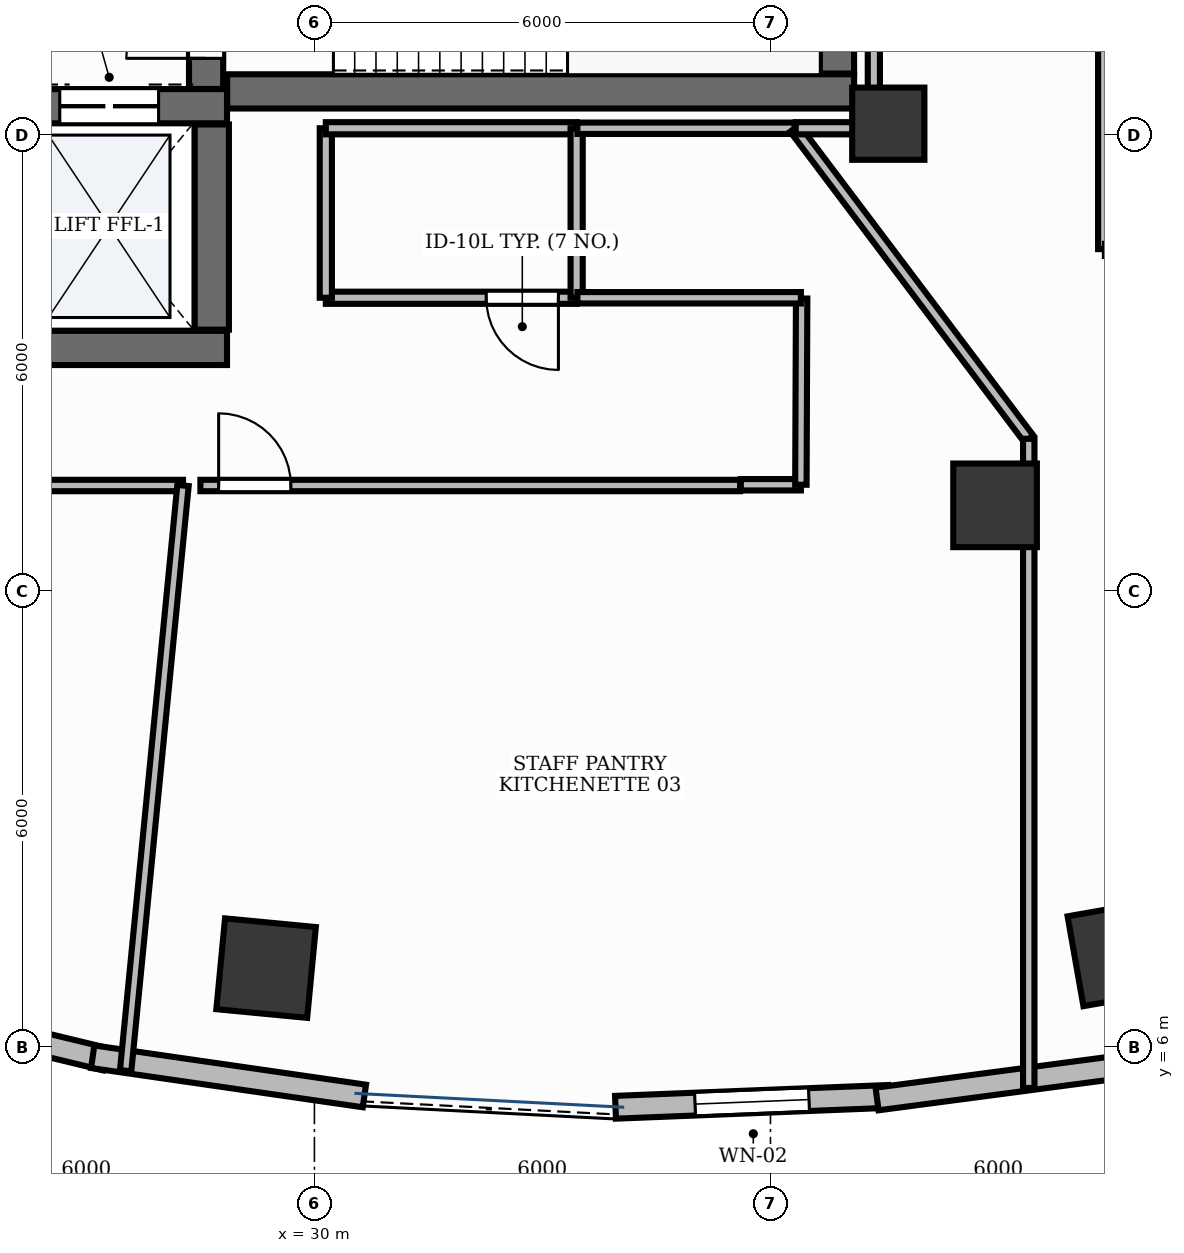
"""IFC4 building model, lengths in metres.
Left out: names, types, materials, properties, quantities, classifications, styles, units other than length and angle.
Written with IfcOpenShell. Run it as: python <this file> out.ifc"""

import sys

from ifc_helpers import new_model, si_unit, direction, frame, frame_2d, origin, origin_2d, place, context, subcontext, project, spatial, rectangle, extrude, element, fill, save


model = new_model("IFC4")
c1 = context("Model", 3, precision=1e-05, world=origin(), true_north=direction((0.0, 1.0)))
c2 = subcontext(c1, "Body", "Model", "MODEL_VIEW")
j1 = project(units=[si_unit("LENGTHUNIT", "METRE"), si_unit("PLANEANGLEUNIT", "RADIAN")], contexts=[c1])
p1 = place(None, origin())
s1 = spatial("IfcSite", under=j1, at=p1, CompositionType="ELEMENT")
p2 = place(p1, origin())
s2 = spatial("IfcBuilding", under=s1, at=p2, CompositionType="ELEMENT")
p3 = place(p2, frame((0.0, 0.0, 98.4)))
s3 = spatial("IfcBuildingStorey", under=s2, at=p3, CompositionType="ELEMENT", Elevation=98.4)
p4 = place(p3, frame((28.852, 18.575, 0.0), z_axis=(0.0, 0.0, 1.0), x_axis=(1.0, 0.0, 0.0)))
e1 = element("IfcWall", 1, at=p4, inside=s3, PredefinedType="SHEAR", context=c2, shape_type="SweptSolid", body=[
    extrude(rectangle(XDim=8.248, YDim=0.45, at=frame_2d((4.124, 0.0))), origin(), (0.0, 0.0, 1.0), 3.9),
])
p5 = place(p3, frame((36.875, 18.81, 0.0), z_axis=(0.0, 0.0, 1.0), x_axis=(0.0, 1.0, 0.0)))
e2 = element("IfcWall", 2, at=p5, inside=s3, PredefinedType="SHEAR", context=c2, shape_type="SweptSolid", body=[
    extrude(rectangle(XDim=3.08, YDim=0.45, at=frame_2d((1.54, 0.0))), origin(), (0.0, 0.0, 1.0), 3.9),
])
p6 = place(p3, frame((28.575, 18.607, 0.0), z_axis=(0.0, 0.0, 1.0), x_axis=(0.0, 1.0, 0.0)))
e3 = element("IfcWall", 3, at=p6, inside=s3, PredefinedType="SHEAR", context=c2, shape_type="SweptSolid", body=[
    extrude(rectangle(XDim=3.283, YDim=0.45, at=frame_2d((1.642, 0.0))), origin(), (0.0, 0.0, 1.0), 3.9),
])
p7 = place(p6, frame((0.403, 0.0, 0.0)))
e4 = element("IfcOpeningElement", 4, at=p7, cuts=e3, PredefinedType="OPENING", context=c2, shape_type="SweptSolid", body=[
    extrude(rectangle(XDim=1.05, YDim=2.15, at=frame_2d((0.525, 1.075))), frame((0.0, 0.24, 0.0), z_axis=(0.0, -1.0, 0.0), x_axis=(1.0, 0.0, 0.0)), (0.0, 0.0, 1.0), 0.48),
])
p8 = place(p3, frame((25.75, 15.2, 0.0), z_axis=(0.0, 0.0, 1.0), x_axis=(1.0, 0.0, 0.0)))
e5 = element("IfcWall", 5, at=p8, inside=s3, PredefinedType="SHEAR", context=c2, shape_type="SweptSolid", body=[
    extrude(rectangle(XDim=3.1, YDim=0.45, at=frame_2d((1.55, 0.0))), origin(), (0.0, 0.0, 1.0), 3.9),
])
p9 = place(p3, frame((25.75, 18.38, 0.0), z_axis=(0.0, 0.0, 1.0), x_axis=(1.0, 0.0, 0.0)))
e6 = element("IfcWall", 6, at=p9, inside=s3, PredefinedType="SHEAR", context=c2, shape_type="SweptSolid", body=[
    extrude(rectangle(XDim=3.1, YDim=0.45, at=frame_2d((1.55, 0.0))), origin(), (0.0, 0.0, 1.0), 3.9),
])
p10 = place(p9, frame((0.9, 0.0, 0.0)))
e7 = element("IfcOpeningElement", 7, at=p10, cuts=e6, PredefinedType="OPENING", context=c2, shape_type="SweptSolid", body=[
    extrude(rectangle(XDim=1.3, YDim=2.2, at=frame_2d((0.65, 1.1))), frame((0.0, 0.24, 0.0), z_axis=(0.0, -1.0, 0.0), x_axis=(1.0, 0.0, 0.0)), (0.0, 0.0, 1.0), 0.48),
])
p11 = place(p3, frame((28.65, 15.44, 0.0), z_axis=(0.0, 0.0, 1.0), x_axis=(0.0, 1.0, 0.0)))
e8 = element("IfcWall", 8, at=p11, inside=s3, PredefinedType="SHEAR", context=c2, shape_type="SweptSolid", body=[
    extrude(rectangle(XDim=2.7, YDim=0.45, at=frame_2d((1.35, 0.0))), origin(), (0.0, 0.0, 1.0), 3.9),
])
p12 = place(p3, frame((37.55, 18.15, -0.0), z_axis=(0.0, 0.0, 1.0), x_axis=(1.0, 0.0, 0.0)))
e9 = element("IfcColumn", 9, at=p12, inside=s3, PredefinedType="PILASTER", context=c2, shape_type="SweptSolid", body=[
    extrude(rectangle(XDim=0.95, YDim=0.95, at=origin_2d()), origin(), (0.0, 0.0, 1.0), 3.901),
])
for number, where, z_axis, x_axis in (
    (10, (29.364, 7.041, -0.0), (0.0, 0.0, 1.0), (-0.995, 0.095, 0.0)),
    (11, (40.604, 7.235, -0.0), (0.0, 0.0, 1.0), (0.985, 0.173, 0.0)),
):
    element("IfcColumn", number, at=place(p3, frame(where, z_axis=z_axis, x_axis=x_axis)), inside=s3, PredefinedType="COLUMN", context=c2, shape_type="SweptSolid", body=[
        extrude(rectangle(XDim=1.2, YDim=1.2, at=origin_2d()), origin(), (0.0, 0.0, 1.0), 3.901),
    ])
p13 = place(p3, frame((38.955, 13.129, -0.0), z_axis=(0.0, 0.0, 1.0), x_axis=(1.0, 0.0, 0.0)))
e12 = element("IfcColumn", 12, at=p13, inside=s3, PredefinedType="COLUMN", context=c2, shape_type="SweptSolid", body=[
    extrude(rectangle(XDim=1.1, YDim=1.1, at=origin_2d()), origin(), (0.0, 0.0, 1.0), 3.901),
])
p14 = place(p3, frame((33.961, 5.21, 0.0), z_axis=(0.0, 0.0, 1.0), x_axis=(0.999210691503, 0.039723972445, 0.0)))
e13 = element("IfcWall", 13, at=p14, inside=s3, PredefinedType="STANDARD", context=c2, shape_type="SweptSolid", body=[
    extrude(rectangle(XDim=3.595, YDim=0.3, at=frame_2d((1.798, 0.0))), origin(), (0.0, 0.0, 1.0), 3.9),
])
p15 = place(p14, frame((1.048, 0.0, 0.95)))
e14 = element("IfcOpeningElement", 14, at=p15, cuts=e13, PredefinedType="OPENING", context=c2, shape_type="SweptSolid", body=[
    extrude(rectangle(XDim=1.5, YDim=1.8, at=frame_2d((0.75, 0.9))), frame((0.0, 0.165, 0.0), z_axis=(0.0, -1.0, 0.0), x_axis=(1.0, 0.0, 0.0)), (0.0, 0.0, 1.0), 0.33),
])
p16 = place(p3, frame((23.784, 6.68, 0.0), z_axis=(0.0, 0.0, 1.0), x_axis=(0.972043452321, -0.234801036625, 0.0)))
e15 = element("IfcWall", 15, at=p16, inside=s3, PredefinedType="STANDARD", context=c2, shape_type="SweptSolid", body=[
    extrude(rectangle(XDim=3.569, YDim=0.3, at=frame_2d((1.784, 0.0))), origin(), (0.0, 0.0, 1.0), 3.9),
])
p17 = place(p3, frame((27.083, 5.875, 0.0), z_axis=(0.0, 0.0, 1.0), x_axis=(0.989734732902, -0.142916613754, 0.0)))
e16 = element("IfcWall", 16, at=p17, inside=s3, PredefinedType="STANDARD", context=c2, shape_type="SweptSolid", body=[
    extrude(rectangle(XDim=3.611, YDim=0.3, at=frame_2d((1.806, 0.0))), origin(), (0.0, 0.0, 1.0), 3.9),
])
p18 = place(p3, frame((37.402, 5.319, 0.0), z_axis=(0.0, 0.0, 1.0), x_axis=(0.991372969521, 0.131071107816, 0.0)))
e17 = element("IfcWall", 17, at=p18, inside=s3, PredefinedType="STANDARD", context=c2, shape_type="SweptSolid", body=[
    extrude(rectangle(XDim=3.615, YDim=0.3, at=frame_2d((1.808, 0.0))), origin(), (0.0, 0.0, 1.0), 3.9),
])
p19 = place(p3, frame((33.45, 15.86, 0.0), z_axis=(0.0, 0.0, 1.0), x_axis=(-1.0, 0.0, 0.0)))
e18 = element("IfcWall", 18, at=p19, inside=s3, PredefinedType="PARTITIONING", context=c2, shape_type="SweptSolid", body=[
    extrude(rectangle(XDim=3.3, YDim=0.16, at=frame_2d((1.65, 0.0))), origin(), (0.0, 0.0, 1.0), 2.91),
])
p20 = place(p19, frame((0.24, 0.0, 0.0)))
e19 = element("IfcOpeningElement", 19, at=p20, cuts=e18, PredefinedType="OPENING", context=c2, shape_type="SweptSolid", body=[
    extrude(rectangle(XDim=0.95, YDim=2.15, at=frame_2d((0.475, 1.075))), frame((0.0, 0.095, 0.0), z_axis=(0.0, -1.0, 0.0), x_axis=(1.0, 0.0, 0.0)), (0.0, 0.0, 1.0), 0.19),
])
p21 = place(p3, frame((21.8, 13.39, 0.0), z_axis=(0.0, 0.0, 1.0), x_axis=(1.0, 0.0, 0.0)))
e20 = element("IfcWall", 20, at=p21, inside=s3, PredefinedType="PARTITIONING", context=c2, shape_type="SweptSolid", body=[
    extrude(rectangle(XDim=6.471, YDim=0.15, at=frame_2d((3.236, 0.0))), origin(), (0.0, 0.0, 1.0), 2.91),
])
p22 = place(p21, frame((0.859, 0.0, 0.0)))
e21 = element("IfcOpeningElement", 21, at=p22, cuts=e20, PredefinedType="OPENING", context=c2, shape_type="SweptSolid", body=[
    extrude(rectangle(XDim=0.95, YDim=2.15, at=frame_2d((0.475, 1.075))), frame((0.0, 0.09, 0.0), z_axis=(0.0, -1.0, 0.0), x_axis=(1.0, 0.0, 0.0)), (0.0, 0.0, 1.0), 0.18),
])
p23 = place(p3, frame((28.5, 13.39, 0.0), z_axis=(0.0, 0.0, 1.0), x_axis=(1.0, 0.0, 0.0)))
e22 = element("IfcWall", 22, at=p23, inside=s3, PredefinedType="PARTITIONING", context=c2, shape_type="SweptSolid", body=[
    extrude(rectangle(XDim=7.1, YDim=0.15, at=frame_2d((3.55, 0.0))), origin(), (0.0, 0.0, 1.0), 2.91),
])
p24 = place(p23, frame((0.24, 0.0, 0.0)))
e23 = element("IfcOpeningElement", 23, at=p24, cuts=e22, PredefinedType="OPENING", context=c2, shape_type="SweptSolid", body=[
    extrude(rectangle(XDim=0.95, YDim=2.15, at=frame_2d((0.475, 1.075))), frame((0.0, 0.09, 0.0), z_axis=(0.0, -1.0, 0.0), x_axis=(1.0, 0.0, 0.0)), (0.0, 0.0, 1.0), 0.18),
])
p25 = place(p3, frame((30.15, 15.86, 0.0), z_axis=(0.0, 0.0, 1.0), x_axis=(0.0, 1.0, 0.0)))
e24 = element("IfcWall", 24, at=p25, inside=s3, PredefinedType="PARTITIONING", context=c2, shape_type="SweptSolid", body=[
    extrude(rectangle(XDim=2.23, YDim=0.16, at=frame_2d((1.115, 0.0))), origin(), (0.0, 0.0, 1.0), 2.91),
])
p26 = place(p3, frame((30.15, 18.09, 0.0), z_axis=(0.0, 0.0, 1.0), x_axis=(1.0, 0.0, 0.0)))
e25 = element("IfcWall", 25, at=p26, inside=s3, PredefinedType="PARTITIONING", context=c2, shape_type="SweptSolid", body=[
    extrude(rectangle(XDim=3.3, YDim=0.16, at=frame_2d((1.65, 0.0))), origin(), (0.0, 0.0, 1.0), 2.91),
])
p27 = place(p3, frame((33.45, 18.09, 0.0), z_axis=(0.0, 0.0, 1.0), x_axis=(0.0, -1.0, 0.0)))
e26 = element("IfcWall", 26, at=p27, inside=s3, PredefinedType="PARTITIONING", context=c2, shape_type="SweptSolid", body=[
    extrude(rectangle(XDim=2.23, YDim=0.16, at=frame_2d((1.115, 0.0))), origin(), (0.0, 0.0, 1.0), 2.91),
])
p28 = place(p3, frame((28.271, 13.39, 0.0), z_axis=(0.0, 0.0, 1.0), x_axis=(-0.097584908723, -0.995227202999, 0.0)))
e27 = element("IfcWall", 27, at=p28, inside=s3, PredefinedType="PARTITIONING", context=c2, shape_type="SweptSolid", body=[
    extrude(rectangle(XDim=7.736, YDim=0.15, at=frame_2d((3.868, 0.0))), origin(), (0.0, 0.0, 1.0), 2.91),
])
p29 = place(p3, frame((35.61, 13.4, 0.0), z_axis=(0.0, 0.0, 1.0), x_axis=(1.0, 0.0, 0.0)))
e28 = element("IfcWall", 28, at=p29, inside=s3, PredefinedType="PARTITIONING", context=c2, shape_type="SweptSolid", body=[
    extrude(rectangle(XDim=0.79, YDim=0.15, at=frame_2d((0.395, 0.0))), origin(), (0.0, 0.0, 1.0), 2.91),
])
p30 = place(p3, frame((36.4, 13.4, 0.0), z_axis=(0.0, 0.0, 1.0), x_axis=(0.004085258855, 0.999991655295, 0.0)))
e29 = element("IfcWall", 29, at=p30, inside=s3, PredefinedType="PARTITIONING", context=c2, shape_type="SweptSolid", body=[
    extrude(rectangle(XDim=2.45, YDim=0.15, at=frame_2d((1.225, 0.0))), origin(), (0.0, 0.0, 1.0), 2.91),
])
p31 = place(p3, frame((36.4, 15.86, 0.0), z_axis=(0.0, 0.0, 1.0), x_axis=(-1.0, 0.0, 0.0)))
e30 = element("IfcWall", 30, at=p31, inside=s3, PredefinedType="PARTITIONING", context=c2, shape_type="SweptSolid", body=[
    extrude(rectangle(XDim=2.94, YDim=0.15, at=frame_2d((1.47, 0.0))), origin(), (0.0, 0.0, 1.0), 2.91),
])
p32 = place(p3, frame((33.46, 18.09, 0.0), z_axis=(0.0, 0.0, 1.0), x_axis=(1.0, 0.0, 0.0)))
e31 = element("IfcWall", 31, at=p32, inside=s3, PredefinedType="PARTITIONING", context=c2, shape_type="SweptSolid", body=[
    extrude(rectangle(XDim=2.859, YDim=0.15, at=frame_2d((1.43, 0.0))), origin(), (0.0, 0.0, 1.0), 2.91),
])
p33 = place(p3, frame((36.319, 18.09, 0.0), z_axis=(0.0, 0.0, 1.0), x_axis=(0.601792892962, -0.798652185861, 0.0)))
e32 = element("IfcWall", 32, at=p33, inside=s3, PredefinedType="PARTITIONING", context=c2, shape_type="SweptSolid", body=[
    extrude(rectangle(XDim=5.116, YDim=0.15, at=frame_2d((2.558, 0.0))), origin(), (0.0, 0.0, 1.0), 2.91),
])
p34 = place(p3, frame((39.398, 14.004, 0.0), z_axis=(0.0, 0.0, 1.0), x_axis=(0.0, -1.0, 0.0)))
e33 = element("IfcWall", 33, at=p34, inside=s3, PredefinedType="PARTITIONING", context=c2, shape_type="SweptSolid", body=[
    extrude(rectangle(XDim=8.54, YDim=0.15, at=frame_2d((4.27, 0.0))), origin(), (0.0, 0.0, 1.0), 2.91),
])
p35 = place(p3, frame((40.39, 20.416, 0.0), z_axis=(0.0, 0.0, 1.0), x_axis=(0.0, -1.0, 0.0)))
e34 = element("IfcWall", 34, at=p35, inside=s3, PredefinedType="PARTITIONING", context=c2, shape_type="SweptSolid", body=[
    extrude(rectangle(XDim=3.916, YDim=0.16, at=frame_2d((1.958, 0.0))), origin(), (0.0, 0.0, 1.0), 2.91),
])
p36 = place(p3, frame((36.332, 18.09, 0.0), z_axis=(0.0, 0.0, 1.0), x_axis=(1.0, 0.0, 0.0)))
e35 = element("IfcWall", 35, at=p36, inside=s3, PredefinedType="PARTITIONING", context=c2, shape_type="SweptSolid", body=[
    extrude(rectangle(XDim=1.018, YDim=0.16, at=frame_2d((0.509, 0.0))), origin(), (0.0, 0.0, 1.0), 2.91),
])
p37 = place(p3, frame((37.36, 18.1, 0.0), z_axis=(0.0, 0.0, 1.0), x_axis=(0.0, 1.0, 0.0)))
e36 = element("IfcWall", 36, at=p37, inside=s3, PredefinedType="PARTITIONING", context=c2, shape_type="SweptSolid", body=[
    extrude(rectangle(XDim=4.166, YDim=0.16, at=frame_2d((2.083, 0.0))), origin(), (0.0, 0.0, 1.0), 2.91),
])
p38 = place(p15, origin())
e37 = element("IfcWindow", 37, at=p38, inside=s3, PartitioningType="DOUBLE_PANEL_VERTICAL", PredefinedType="WINDOW", context=c2, shape_type="SweptSolid", body=[
    extrude(rectangle(XDim=1.5, YDim=1.8, at=frame_2d((0.75, 0.9))), frame((0.0, 0.03, 0.0), z_axis=(0.0, -1.0, 0.0), x_axis=(1.0, 0.0, 0.0)), (0.0, 0.0, 1.0), 0.06),
])
fill(e14, e37)
p39 = place(p7, origin())
e38 = element("IfcDoor", 38, at=p39, inside=s3, OperationType="SINGLE_SWING_LEFT", PredefinedType="DOOR", context=c2, shape_type="SweptSolid", body=[
    extrude(rectangle(XDim=1.05, YDim=2.15, at=frame_2d((0.525, 1.075))), frame((0.0, 0.025, 0.0), z_axis=(0.0, -1.0, 0.0), x_axis=(1.0, 0.0, 0.0)), (0.0, 0.0, 1.0), 0.05),
])
fill(e4, e38)
p40 = place(p10, origin())
e39 = element("IfcDoor", 39, at=p40, inside=s3, OperationType="DOUBLE_DOOR_SLIDING", PredefinedType="DOOR", context=c2, shape_type="SweptSolid", body=[
    extrude(rectangle(XDim=1.3, YDim=2.2, at=frame_2d((0.65, 1.1))), frame((0.0, 0.025, 0.0), z_axis=(0.0, -1.0, 0.0), x_axis=(1.0, 0.0, 0.0)), (0.0, 0.0, 1.0), 0.05),
])
fill(e7, e39)
p41 = place(p20, origin())
e40 = element("IfcDoor", 40, at=p41, inside=s3, OperationType="SINGLE_SWING_LEFT", PredefinedType="DOOR", context=c2, shape_type="SweptSolid", body=[
    extrude(rectangle(XDim=0.95, YDim=2.15, at=frame_2d((0.475, 1.075))), frame((0.0, 0.025, 0.0), z_axis=(0.0, -1.0, 0.0), x_axis=(1.0, 0.0, 0.0)), (0.0, 0.0, 1.0), 0.05),
])
fill(e19, e40)
p42 = place(p24, origin())
e41 = element("IfcDoor", 41, at=p42, inside=s3, OperationType="SINGLE_SWING_LEFT", PredefinedType="DOOR", context=c2, shape_type="SweptSolid", body=[
    extrude(rectangle(XDim=0.95, YDim=2.15, at=frame_2d((0.475, 1.075))), frame((0.0, 0.025, 0.0), z_axis=(0.0, -1.0, 0.0), x_axis=(1.0, 0.0, 0.0)), (0.0, 0.0, 1.0), 0.05),
])
fill(e23, e41)
save(model, sys.argv[1])
